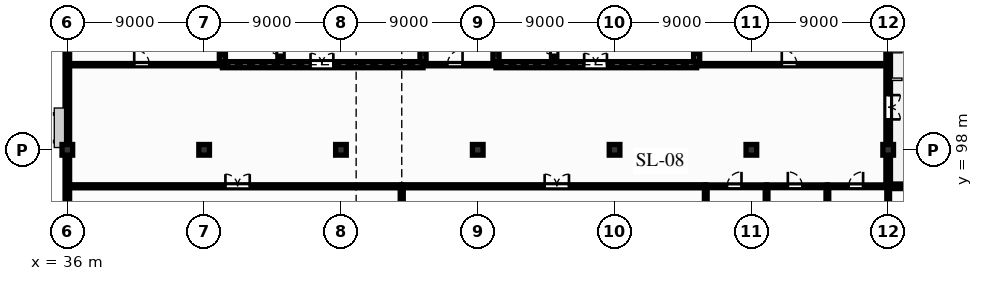
"""IFC4 building model, lengths in metres.
Left out: names, types, materials, properties, quantities, classifications, styles, units other than length and angle.
Written with IfcOpenShell. Run it as: python <this file> out.ifc"""

import sys

from ifc_helpers import new_model, si_unit, direction, frame, frame_2d, origin, origin_2d, place, context, subcontext, project, spatial, rectangle, extrude, element, fill, save


model = new_model("IFC4")
c1 = context("Model", 3, precision=1e-05, world=origin(), true_north=direction((0.0, 1.0)))
c2 = subcontext(c1, "Body", "Model", "MODEL_VIEW")
j1 = project(units=[si_unit("LENGTHUNIT", "METRE"), si_unit("PLANEANGLEUNIT", "RADIAN")], contexts=[c1])
p1 = place(None, origin())
s1 = spatial("IfcSite", under=j1, at=p1, CompositionType="ELEMENT")
p2 = place(p1, origin())
s2 = spatial("IfcBuilding", under=s1, at=p2, CompositionType="ELEMENT")
p3 = place(p2, frame((0.0, 0.0, 12.78)))
s3 = spatial("IfcBuildingStorey", under=s2, at=p3, CompositionType="ELEMENT", Elevation=12.78)
for number, where, z_axis, x_axis in (
    (1, (36.0, 98.0, 0.0), (0.0, 0.0, 1.0), (1.0, 0.0, 0.0)),
    (2, (45.0, 98.0, 0.0), (0.0, 0.0, 1.0), (1.0, 0.0, 0.0)),
    (3, (54.0, 98.0, 0.0), (0.0, 0.0, 1.0), (1.0, 0.0, 0.0)),
    (4, (63.0, 98.0, 0.0), (0.0, 0.0, 1.0), (1.0, 0.0, 0.0)),
    (5, (72.0, 98.0, 0.0), (0.0, 0.0, 1.0), (1.0, 0.0, 0.0)),
    (6, (81.0, 98.0, 0.0), (0.0, 0.0, 1.0), (1.0, 0.0, 0.0)),
    (7, (90.0, 98.0, 0.0), (0.0, 0.0, 1.0), (1.0, 0.0, 0.0)),
):
    element("IfcColumn", number, at=place(p3, frame(where, z_axis=z_axis, x_axis=x_axis)), inside=s3, PredefinedType="COLUMN", context=c2, shape_type="SweptSolid", body=[
        extrude(rectangle(XDim=0.7, YDim=0.7, at=origin_2d()), origin(), (0.0, 0.0, 1.0), 3.74),
    ])
p4 = place(p3, frame((36.0, 82.2, 0.0), z_axis=(0.0, 0.0, 1.0), x_axis=(0.0, 1.0, 0.0)))
e8 = element("IfcWall", 8, at=p4, inside=s3, PredefinedType="SOLIDWALL", context=c2, shape_type="SweptSolid", body=[
    extrude(rectangle(XDim=31.8, YDim=0.3, at=frame_2d((15.9, 0.0))), origin(), (0.0, 0.0, 1.0), 2.705),
])
p5 = place(p4, frame((3.0, 0.0, 0.735)))
e9 = element("IfcOpeningElement", 9, at=p5, cuts=e8, PredefinedType="OPENING", context=c2, shape_type="SweptSolid", body=[
    extrude(rectangle(XDim=1.35, YDim=1.85, at=frame_2d((0.675, 0.925))), frame((0.0, 0.16, 0.0), z_axis=(0.0, -1.0, 0.0), x_axis=(1.0, 0.0, 0.0)), (0.0, 0.0, 1.0), 0.32),
])
p6 = place(p4, frame((9.5, 0.0, 0.835)))
e10 = element("IfcOpeningElement", 10, at=p6, cuts=e8, PredefinedType="OPENING", context=c2, shape_type="SweptSolid", body=[
    extrude(rectangle(XDim=1.05, YDim=1.75, at=frame_2d((0.525, 0.875))), frame((0.0, 0.16, 0.0), z_axis=(0.0, -1.0, 0.0), x_axis=(1.0, 0.0, 0.0)), (0.0, 0.0, 1.0), 0.32),
])
p7 = place(p4, frame((16.5, 0.0, 0.485)))
e11 = element("IfcOpeningElement", 11, at=p7, cuts=e8, PredefinedType="OPENING", context=c2, shape_type="SweptSolid", body=[
    extrude(rectangle(XDim=1.5, YDim=2.1, at=frame_2d((0.75, 1.05))), frame((0.0, 0.16, 0.0), z_axis=(0.0, -1.0, 0.0), x_axis=(1.0, 0.0, 0.0)), (0.0, 0.0, 1.0), 0.32),
])
p8 = place(p3, frame((99.0, 95.6, 0.0), z_axis=(0.0, 0.0, 1.0), x_axis=(-1.0, 0.0, 0.0)))
e12 = element("IfcWall", 12, at=p8, inside=s3, PredefinedType="SOLIDWALL", context=c2, shape_type="SweptSolid", body=[
    extrude(rectangle(XDim=9.0, YDim=0.3, at=frame_2d((4.5, 0.0))), origin(), (0.0, 0.0, 1.0), 3.42),
])
p9 = place(p8, frame((2.8, 0.0, 0.95)))
e13 = element("IfcOpeningElement", 13, at=p9, cuts=e12, PredefinedType="OPENING", context=c2, shape_type="SweptSolid", body=[
    extrude(rectangle(XDim=1.8, YDim=2.1, at=frame_2d((0.9, 1.05))), frame((0.0, 0.16, 0.0), z_axis=(0.0, -1.0, 0.0), x_axis=(1.0, 0.0, 0.0)), (0.0, 0.0, 1.0), 0.32),
])
p10 = place(p3, frame((90.0, 95.6, 0.0), z_axis=(0.0, 0.0, 1.0), x_axis=(0.0, 1.0, 0.0)))
e14 = element("IfcWall", 14, at=p10, inside=s3, PredefinedType="SOLIDWALL", context=c2, shape_type="SweptSolid", body=[
    extrude(rectangle(XDim=18.4, YDim=0.3, at=frame_2d((9.2, 0.0))), origin(), (0.0, 0.0, 1.0), 2.805),
])
p11 = place(p10, frame((4.4, 0.0, 0.0)))
e15 = element("IfcOpeningElement", 15, at=p11, cuts=e14, PredefinedType="OPENING", context=c2, shape_type="SweptSolid", body=[
    extrude(rectangle(XDim=1.6, YDim=2.25, at=frame_2d((0.8, 1.125))), frame((0.0, 0.16, 0.0), z_axis=(0.0, -1.0, 0.0), x_axis=(1.0, 0.0, 0.0)), (0.0, 0.0, 1.0), 0.32),
])
p12 = place(p10, frame((12.8, 0.0, 0.935)))
e16 = element("IfcOpeningElement", 16, at=p12, cuts=e14, PredefinedType="OPENING", context=c2, shape_type="SweptSolid", body=[
    extrude(rectangle(XDim=1.05, YDim=1.75, at=frame_2d((0.525, 0.875))), frame((0.0, 0.16, 0.0), z_axis=(0.0, -1.0, 0.0), x_axis=(1.0, 0.0, 0.0)), (0.0, 0.0, 1.0), 0.32),
])
p13 = place(p3, frame((46.2, 103.6, 0.0), z_axis=(0.0, 0.0, 1.0), x_axis=(1.0, 0.0, 0.0)))
e17 = element("IfcWall", 17, at=p13, inside=s3, PredefinedType="SHEAR", context=c2, shape_type="SweptSolid", body=[
    extrude(rectangle(XDim=13.2, YDim=0.4, at=frame_2d((6.6, 0.0))), origin(), (0.0, 0.0, 1.0), 3.42),
])
p14 = place(p13, frame((5.8, 0.0, 0.0)))
e18 = element("IfcOpeningElement", 18, at=p14, cuts=e17, PredefinedType="OPENING", context=c2, shape_type="SweptSolid", body=[
    extrude(rectangle(XDim=1.5, YDim=2.2, at=frame_2d((0.75, 1.1))), frame((0.0, 0.21, 0.0), z_axis=(0.0, -1.0, 0.0), x_axis=(1.0, 0.0, 0.0)), (0.0, 0.0, 1.0), 0.42),
])
for number, where, z_axis, x_axis in (
    (19, (46.2, 103.8, 0.0), (0.0, 0.0, 1.0), (0.0, 1.0, 0.0)),
    (20, (59.4, 103.8, 0.0), (0.0, 0.0, 1.0), (0.0, 1.0, 0.0)),
):
    element("IfcWall", number, at=place(p3, frame(where, z_axis=z_axis, x_axis=x_axis)), inside=s3, PredefinedType="SHEAR", context=c2, shape_type="SweptSolid", body=[
        extrude(rectangle(XDim=10.01, YDim=0.4, at=frame_2d((5.005, 0.0))), origin(), (0.0, 0.0, 1.0), 3.42),
    ])
p15 = place(p3, frame((50.025, 103.8, 0.0), z_axis=(0.0, 0.0, 1.0), x_axis=(0.0, 1.0, 0.0)))
e21 = element("IfcWall", 21, at=p15, inside=s3, PredefinedType="SHEAR", context=c2, shape_type="SweptSolid", body=[
    extrude(rectangle(XDim=10.01, YDim=0.35, at=frame_2d((5.005, 0.0))), origin(), (0.0, 0.0, 1.0), 3.42),
])
p16 = place(p15, frame((0.45, 0.0, 0.0)))
e22 = element("IfcOpeningElement", 22, at=p16, cuts=e21, PredefinedType="OPENING", context=c2, shape_type="SweptSolid", body=[
    extrude(rectangle(XDim=1.05, YDim=2.2, at=frame_2d((0.525, 1.1))), frame((0.0, 0.185, 0.0), z_axis=(0.0, -1.0, 0.0), x_axis=(1.0, 0.0, 0.0)), (0.0, 0.0, 1.0), 0.37),
])
p17 = place(p3, frame((64.2, 103.6, 0.0), z_axis=(0.0, 0.0, 1.0), x_axis=(1.0, 0.0, 0.0)))
e23 = element("IfcWall", 23, at=p17, inside=s3, PredefinedType="SHEAR", context=c2, shape_type="SweptSolid", body=[
    extrude(rectangle(XDim=13.2, YDim=0.4, at=frame_2d((6.6, 0.0))), origin(), (0.0, 0.0, 1.0), 3.42),
])
p18 = place(p17, frame((5.8, 0.0, 0.0)))
e24 = element("IfcOpeningElement", 24, at=p18, cuts=e23, PredefinedType="OPENING", context=c2, shape_type="SweptSolid", body=[
    extrude(rectangle(XDim=1.5, YDim=2.2, at=frame_2d((0.75, 1.1))), frame((0.0, 0.21, 0.0), z_axis=(0.0, -1.0, 0.0), x_axis=(1.0, 0.0, 0.0)), (0.0, 0.0, 1.0), 0.42),
])
for number, where, z_axis, x_axis in (
    (25, (64.2, 103.8, 0.0), (0.0, 0.0, 1.0), (0.0, 1.0, 0.0)),
    (26, (77.4, 103.8, 0.0), (0.0, 0.0, 1.0), (0.0, 1.0, 0.0)),
):
    element("IfcWall", number, at=place(p3, frame(where, z_axis=z_axis, x_axis=x_axis)), inside=s3, PredefinedType="SHEAR", context=c2, shape_type="SweptSolid", body=[
        extrude(rectangle(XDim=10.01, YDim=0.4, at=frame_2d((5.005, 0.0))), origin(), (0.0, 0.0, 1.0), 3.42),
    ])
p19 = place(p3, frame((68.025, 103.8, 0.0), z_axis=(0.0, 0.0, 1.0), x_axis=(0.0, 1.0, 0.0)))
e27 = element("IfcWall", 27, at=p19, inside=s3, PredefinedType="SHEAR", context=c2, shape_type="SweptSolid", body=[
    extrude(rectangle(XDim=10.01, YDim=0.35, at=frame_2d((5.005, 0.0))), origin(), (0.0, 0.0, 1.0), 3.42),
])
p20 = place(p19, frame((0.45, 0.0, 0.0)))
e28 = element("IfcOpeningElement", 28, at=p20, cuts=e27, PredefinedType="OPENING", context=c2, shape_type="SweptSolid", body=[
    extrude(rectangle(XDim=1.05, YDim=2.2, at=frame_2d((0.525, 1.1))), frame((0.0, 0.185, 0.0), z_axis=(0.0, -1.0, 0.0), x_axis=(1.0, 0.0, 0.0)), (0.0, 0.0, 1.0), 0.37),
])
p21 = place(p3, frame((36.0, 95.6, 0.0), z_axis=(0.0, 0.0, 1.0), x_axis=(1.0, 0.0, 0.0)))
e29 = element("IfcWall", 29, at=p21, inside=s3, PredefinedType="PARTITIONING", context=c2, shape_type="SweptSolid", body=[
    extrude(rectangle(XDim=22.0, YDim=0.2, at=frame_2d((11.0, 0.0))), origin(), (0.0, 0.0, 1.0), 3.42),
])
p22 = place(p21, frame((10.4, 0.0, 0.0)))
e30 = element("IfcOpeningElement", 30, at=p22, cuts=e29, PredefinedType="OPENING", context=c2, shape_type="SweptSolid", body=[
    extrude(rectangle(XDim=1.6, YDim=2.2, at=frame_2d((0.8, 1.1))), frame((0.0, 0.11, 0.0), z_axis=(0.0, -1.0, 0.0), x_axis=(1.0, 0.0, 0.0)), (0.0, 0.0, 1.0), 0.22),
])
p23 = place(p3, frame((58.0, 95.6, 0.0), z_axis=(0.0, 0.0, 1.0), x_axis=(1.0, 0.0, 0.0)))
e31 = element("IfcWall", 31, at=p23, inside=s3, PredefinedType="PARTITIONING", context=c2, shape_type="SweptSolid", body=[
    extrude(rectangle(XDim=20.0, YDim=0.2, at=frame_2d((10.0, 0.0))), origin(), (0.0, 0.0, 1.0), 3.42),
])
p24 = place(p23, frame((9.4, 0.0, 0.0)))
e32 = element("IfcOpeningElement", 32, at=p24, cuts=e31, PredefinedType="OPENING", context=c2, shape_type="SweptSolid", body=[
    extrude(rectangle(XDim=1.6, YDim=2.2, at=frame_2d((0.8, 1.1))), frame((0.0, 0.11, 0.0), z_axis=(0.0, -1.0, 0.0), x_axis=(1.0, 0.0, 0.0)), (0.0, 0.0, 1.0), 0.22),
])
p25 = place(p3, frame((58.0, 82.2, 0.0), z_axis=(0.0, 0.0, 1.0), x_axis=(0.0, 1.0, 0.0)))
e33 = element("IfcWall", 33, at=p25, inside=s3, PredefinedType="PARTITIONING", context=c2, shape_type="SweptSolid", body=[
    extrude(rectangle(XDim=13.4, YDim=0.2, at=frame_2d((6.7, 0.0))), origin(), (0.0, 0.0, 1.0), 3.42),
])
p26 = place(p3, frame((78.0, 95.6, 0.0), z_axis=(0.0, 0.0, 1.0), x_axis=(1.0, 0.0, 0.0)))
e34 = element("IfcWall", 34, at=p26, inside=s3, PredefinedType="PLUMBINGWALL", context=c2, shape_type="SweptSolid", body=[
    extrude(rectangle(XDim=4.0, YDim=0.18, at=frame_2d((2.0, 0.0))), origin(), (0.0, 0.0, 1.0), 3.42),
])
p27 = place(p26, frame((1.4, 0.0, 0.0)))
e35 = element("IfcOpeningElement", 35, at=p27, cuts=e34, PredefinedType="OPENING", context=c2, shape_type="SweptSolid", body=[
    extrude(rectangle(XDim=0.95, YDim=2.15, at=frame_2d((0.475, 1.075))), frame((0.0, 0.1, 0.0), z_axis=(0.0, -1.0, 0.0), x_axis=(1.0, 0.0, 0.0)), (0.0, 0.0, 1.0), 0.2),
])
p28 = place(p3, frame((78.0, 82.2, 0.0), z_axis=(0.0, 0.0, 1.0), x_axis=(0.0, 1.0, 0.0)))
e36 = element("IfcWall", 36, at=p28, inside=s3, PredefinedType="PLUMBINGWALL", context=c2, shape_type="SweptSolid", body=[
    extrude(rectangle(XDim=13.4, YDim=0.18, at=frame_2d((6.7, 0.0))), origin(), (0.0, 0.0, 1.0), 3.42),
])
p29 = place(p3, frame((82.0, 95.6, 0.0), z_axis=(0.0, 0.0, 1.0), x_axis=(1.0, 0.0, 0.0)))
e37 = element("IfcWall", 37, at=p29, inside=s3, PredefinedType="PLUMBINGWALL", context=c2, shape_type="SweptSolid", body=[
    extrude(rectangle(XDim=4.0, YDim=0.18, at=frame_2d((2.0, 0.0))), origin(), (0.0, 0.0, 1.0), 3.42),
])
p30 = place(p29, frame((1.4, 0.0, 0.0)))
e38 = element("IfcOpeningElement", 38, at=p30, cuts=e37, PredefinedType="OPENING", context=c2, shape_type="SweptSolid", body=[
    extrude(rectangle(XDim=0.95, YDim=2.15, at=frame_2d((0.475, 1.075))), frame((0.0, 0.1, 0.0), z_axis=(0.0, -1.0, 0.0), x_axis=(1.0, 0.0, 0.0)), (0.0, 0.0, 1.0), 0.2),
])
p31 = place(p3, frame((82.0, 82.2, 0.0), z_axis=(0.0, 0.0, 1.0), x_axis=(0.0, 1.0, 0.0)))
e39 = element("IfcWall", 39, at=p31, inside=s3, PredefinedType="PLUMBINGWALL", context=c2, shape_type="SweptSolid", body=[
    extrude(rectangle(XDim=13.4, YDim=0.18, at=frame_2d((6.7, 0.0))), origin(), (0.0, 0.0, 1.0), 3.42),
])
p32 = place(p3, frame((86.0, 95.6, 0.0), z_axis=(0.0, 0.0, 1.0), x_axis=(1.0, 0.0, 0.0)))
e40 = element("IfcWall", 40, at=p32, inside=s3, PredefinedType="PLUMBINGWALL", context=c2, shape_type="SweptSolid", body=[
    extrude(rectangle(XDim=4.0, YDim=0.18, at=frame_2d((2.0, 0.0))), origin(), (0.0, 0.0, 1.0), 3.42),
])
p33 = place(p32, frame((1.4, 0.0, 0.0)))
e41 = element("IfcOpeningElement", 41, at=p33, cuts=e40, PredefinedType="OPENING", context=c2, shape_type="SweptSolid", body=[
    extrude(rectangle(XDim=0.95, YDim=2.15, at=frame_2d((0.475, 1.075))), frame((0.0, 0.1, 0.0), z_axis=(0.0, -1.0, 0.0), x_axis=(1.0, 0.0, 0.0)), (0.0, 0.0, 1.0), 0.2),
])
p34 = place(p3, frame((86.0, 82.2, 0.0), z_axis=(0.0, 0.0, 1.0), x_axis=(0.0, 1.0, 0.0)))
e42 = element("IfcWall", 42, at=p34, inside=s3, PredefinedType="PLUMBINGWALL", context=c2, shape_type="SweptSolid", body=[
    extrude(rectangle(XDim=13.4, YDim=0.18, at=frame_2d((6.7, 0.0))), origin(), (0.0, 0.0, 1.0), 3.42),
])
p35 = place(p3, frame((36.0, 103.6, 0.0), z_axis=(0.0, 0.0, 1.0), x_axis=(1.0, 0.0, 0.0)))
e43 = element("IfcWall", 43, at=p35, inside=s3, PredefinedType="PARTITIONING", context=c2, shape_type="SweptSolid", body=[
    extrude(rectangle(XDim=10.2, YDim=0.15, at=frame_2d((5.1, 0.0))), origin(), (0.0, 0.0, 1.0), 3.42),
])
p36 = place(p35, frame((4.4, 0.0, 0.0)))
e44 = element("IfcOpeningElement", 44, at=p36, cuts=e43, PredefinedType="OPENING", context=c2, shape_type="SweptSolid", body=[
    extrude(rectangle(XDim=1.0, YDim=2.15, at=frame_2d((0.5, 1.075))), frame((0.0, 0.085, 0.0), z_axis=(0.0, -1.0, 0.0), x_axis=(1.0, 0.0, 0.0)), (0.0, 0.0, 1.0), 0.17),
])
p37 = place(p3, frame((59.4, 103.6, 0.0), z_axis=(0.0, 0.0, 1.0), x_axis=(1.0, 0.0, 0.0)))
e45 = element("IfcWall", 45, at=p37, inside=s3, PredefinedType="PARTITIONING", context=c2, shape_type="SweptSolid", body=[
    extrude(rectangle(XDim=4.8, YDim=0.15, at=frame_2d((2.4, 0.0))), origin(), (0.0, 0.0, 1.0), 3.42),
])
p38 = place(p37, frame((1.6, 0.0, 0.0)))
e46 = element("IfcOpeningElement", 46, at=p38, cuts=e45, PredefinedType="OPENING", context=c2, shape_type="SweptSolid", body=[
    extrude(rectangle(XDim=1.0, YDim=2.15, at=frame_2d((0.5, 1.075))), frame((0.0, 0.085, 0.0), z_axis=(0.0, -1.0, 0.0), x_axis=(1.0, 0.0, 0.0)), (0.0, 0.0, 1.0), 0.17),
])
p39 = place(p3, frame((77.4, 103.6, 0.0), z_axis=(0.0, 0.0, 1.0), x_axis=(1.0, 0.0, 0.0)))
e47 = element("IfcWall", 47, at=p39, inside=s3, PredefinedType="PARTITIONING", context=c2, shape_type="SweptSolid", body=[
    extrude(rectangle(XDim=12.6, YDim=0.15, at=frame_2d((6.3, 0.0))), origin(), (0.0, 0.0, 1.0), 3.42),
])
p40 = place(p39, frame((5.6, 0.0, 0.0)))
e48 = element("IfcOpeningElement", 48, at=p40, cuts=e47, PredefinedType="OPENING", context=c2, shape_type="SweptSolid", body=[
    extrude(rectangle(XDim=1.0, YDim=2.15, at=frame_2d((0.5, 1.075))), frame((0.0, 0.085, 0.0), z_axis=(0.0, -1.0, 0.0), x_axis=(1.0, 0.0, 0.0)), (0.0, 0.0, 1.0), 0.17),
])
p41 = place(p3, frame((90.0, 82.2, 0.0), z_axis=(0.0, 0.0, 1.0), x_axis=(0.0, 1.0, 0.0)))
e49 = element("IfcWall", 49, at=p41, inside=s3, PredefinedType="PLUMBINGWALL", context=c2, shape_type="SweptSolid", body=[
    extrude(rectangle(XDim=13.4, YDim=0.18, at=frame_2d((6.7, 0.0))), origin(), (0.0, 0.0, 1.0), 2.805),
])
p42 = place(p7, origin())
e50 = element("IfcWindow", 50, at=p42, inside=s3, PartitioningType="SINGLE_PANEL", PredefinedType="WINDOW", context=c2, shape_type="SweptSolid", body=[
    extrude(rectangle(XDim=1.5, YDim=2.1, at=frame_2d((0.75, 1.05))), frame((0.0, 0.03, 0.0), z_axis=(0.0, -1.0, 0.0), x_axis=(1.0, 0.0, 0.0)), (0.0, 0.0, 1.0), 0.06),
])
fill(e11, e50)
p43 = place(p11, frame((1.6, 0.0, 0.0), z_axis=(0.0, 0.0, 1.0), x_axis=(-1.0, 0.0, 0.0)))
e51 = element("IfcDoor", 51, at=p43, inside=s3, OperationType="DOUBLE_DOOR_SINGLE_SWING", PredefinedType="DOOR", context=c2, shape_type="SweptSolid", body=[
    extrude(rectangle(XDim=1.6, YDim=2.25, at=frame_2d((0.8, 1.125))), frame((0.0, 0.025, 0.0), z_axis=(0.0, -1.0, 0.0), x_axis=(1.0, 0.0, 0.0)), (0.0, 0.0, 1.0), 0.05),
])
fill(e15, e51)
p44 = place(p14, origin())
e52 = element("IfcDoor", 52, at=p44, inside=s3, OperationType="DOUBLE_DOOR_SINGLE_SWING", PredefinedType="DOOR", context=c2, shape_type="SweptSolid", body=[
    extrude(rectangle(XDim=1.5, YDim=2.2, at=frame_2d((0.75, 1.1))), frame((0.0, 0.025, 0.0), z_axis=(0.0, -1.0, 0.0), x_axis=(1.0, 0.0, 0.0)), (0.0, 0.0, 1.0), 0.05),
])
fill(e18, e52)
p45 = place(p16, origin())
e53 = element("IfcDoor", 53, at=p45, inside=s3, OperationType="SINGLE_SWING_RIGHT", PredefinedType="DOOR", context=c2, shape_type="SweptSolid", body=[
    extrude(rectangle(XDim=1.05, YDim=2.2, at=frame_2d((0.525, 1.1))), frame((0.0, 0.025, 0.0), z_axis=(0.0, -1.0, 0.0), x_axis=(1.0, 0.0, 0.0)), (0.0, 0.0, 1.0), 0.05),
])
fill(e22, e53)
p46 = place(p18, origin())
e54 = element("IfcDoor", 54, at=p46, inside=s3, OperationType="DOUBLE_DOOR_SINGLE_SWING", PredefinedType="DOOR", context=c2, shape_type="SweptSolid", body=[
    extrude(rectangle(XDim=1.5, YDim=2.2, at=frame_2d((0.75, 1.1))), frame((0.0, 0.025, 0.0), z_axis=(0.0, -1.0, 0.0), x_axis=(1.0, 0.0, 0.0)), (0.0, 0.0, 1.0), 0.05),
])
fill(e24, e54)
p47 = place(p20, origin())
e55 = element("IfcDoor", 55, at=p47, inside=s3, OperationType="SINGLE_SWING_RIGHT", PredefinedType="DOOR", context=c2, shape_type="SweptSolid", body=[
    extrude(rectangle(XDim=1.05, YDim=2.2, at=frame_2d((0.525, 1.1))), frame((0.0, 0.025, 0.0), z_axis=(0.0, -1.0, 0.0), x_axis=(1.0, 0.0, 0.0)), (0.0, 0.0, 1.0), 0.05),
])
fill(e28, e55)
p48 = place(p22, origin())
e56 = element("IfcDoor", 56, at=p48, inside=s3, OperationType="DOUBLE_DOOR_SINGLE_SWING", PredefinedType="DOOR", context=c2, shape_type="SweptSolid", body=[
    extrude(rectangle(XDim=1.6, YDim=2.2, at=frame_2d((0.8, 1.1))), frame((0.0, 0.025, 0.0), z_axis=(0.0, -1.0, 0.0), x_axis=(1.0, 0.0, 0.0)), (0.0, 0.0, 1.0), 0.05),
])
fill(e30, e56)
p49 = place(p24, origin())
e57 = element("IfcDoor", 57, at=p49, inside=s3, OperationType="DOUBLE_DOOR_SINGLE_SWING", PredefinedType="DOOR", context=c2, shape_type="SweptSolid", body=[
    extrude(rectangle(XDim=1.6, YDim=2.2, at=frame_2d((0.8, 1.1))), frame((0.0, 0.025, 0.0), z_axis=(0.0, -1.0, 0.0), x_axis=(1.0, 0.0, 0.0)), (0.0, 0.0, 1.0), 0.05),
])
fill(e32, e57)
p50 = place(p27, origin())
e58 = element("IfcDoor", 58, at=p50, inside=s3, OperationType="SINGLE_SWING_RIGHT", PredefinedType="DOOR", context=c2, shape_type="SweptSolid", body=[
    extrude(rectangle(XDim=0.95, YDim=2.15, at=frame_2d((0.475, 1.075))), frame((0.0, 0.025, 0.0), z_axis=(0.0, -1.0, 0.0), x_axis=(1.0, 0.0, 0.0)), (0.0, 0.0, 1.0), 0.05),
])
fill(e35, e58)
p51 = place(p30, origin())
e59 = element("IfcDoor", 59, at=p51, inside=s3, OperationType="SINGLE_SWING_LEFT", PredefinedType="DOOR", context=c2, shape_type="SweptSolid", body=[
    extrude(rectangle(XDim=0.95, YDim=2.15, at=frame_2d((0.475, 1.075))), frame((0.0, 0.025, 0.0), z_axis=(0.0, -1.0, 0.0), x_axis=(1.0, 0.0, 0.0)), (0.0, 0.0, 1.0), 0.05),
])
fill(e38, e59)
p52 = place(p33, origin())
e60 = element("IfcDoor", 60, at=p52, inside=s3, OperationType="SINGLE_SWING_RIGHT", PredefinedType="DOOR", context=c2, shape_type="SweptSolid", body=[
    extrude(rectangle(XDim=0.95, YDim=2.15, at=frame_2d((0.475, 1.075))), frame((0.0, 0.025, 0.0), z_axis=(0.0, -1.0, 0.0), x_axis=(1.0, 0.0, 0.0)), (0.0, 0.0, 1.0), 0.05),
])
fill(e41, e60)
p53 = place(p36, origin())
e61 = element("IfcDoor", 61, at=p53, inside=s3, OperationType="SINGLE_SWING_LEFT", PredefinedType="DOOR", context=c2, shape_type="SweptSolid", body=[
    extrude(rectangle(XDim=1.0, YDim=2.15, at=frame_2d((0.5, 1.075))), frame((0.0, 0.025, 0.0), z_axis=(0.0, -1.0, 0.0), x_axis=(1.0, 0.0, 0.0)), (0.0, 0.0, 1.0), 0.05),
])
fill(e44, e61)
p54 = place(p38, origin())
e62 = element("IfcDoor", 62, at=p54, inside=s3, OperationType="SINGLE_SWING_RIGHT", PredefinedType="DOOR", context=c2, shape_type="SweptSolid", body=[
    extrude(rectangle(XDim=1.0, YDim=2.15, at=frame_2d((0.5, 1.075))), frame((0.0, 0.025, 0.0), z_axis=(0.0, -1.0, 0.0), x_axis=(1.0, 0.0, 0.0)), (0.0, 0.0, 1.0), 0.05),
])
fill(e46, e62)
p55 = place(p40, origin())
e63 = element("IfcDoor", 63, at=p55, inside=s3, OperationType="SINGLE_SWING_LEFT", PredefinedType="DOOR", context=c2, shape_type="SweptSolid", body=[
    extrude(rectangle(XDim=1.0, YDim=2.15, at=frame_2d((0.5, 1.075))), frame((0.0, 0.025, 0.0), z_axis=(0.0, -1.0, 0.0), x_axis=(1.0, 0.0, 0.0)), (0.0, 0.0, 1.0), 0.05),
])
fill(e48, e63)
save(model, sys.argv[1])
